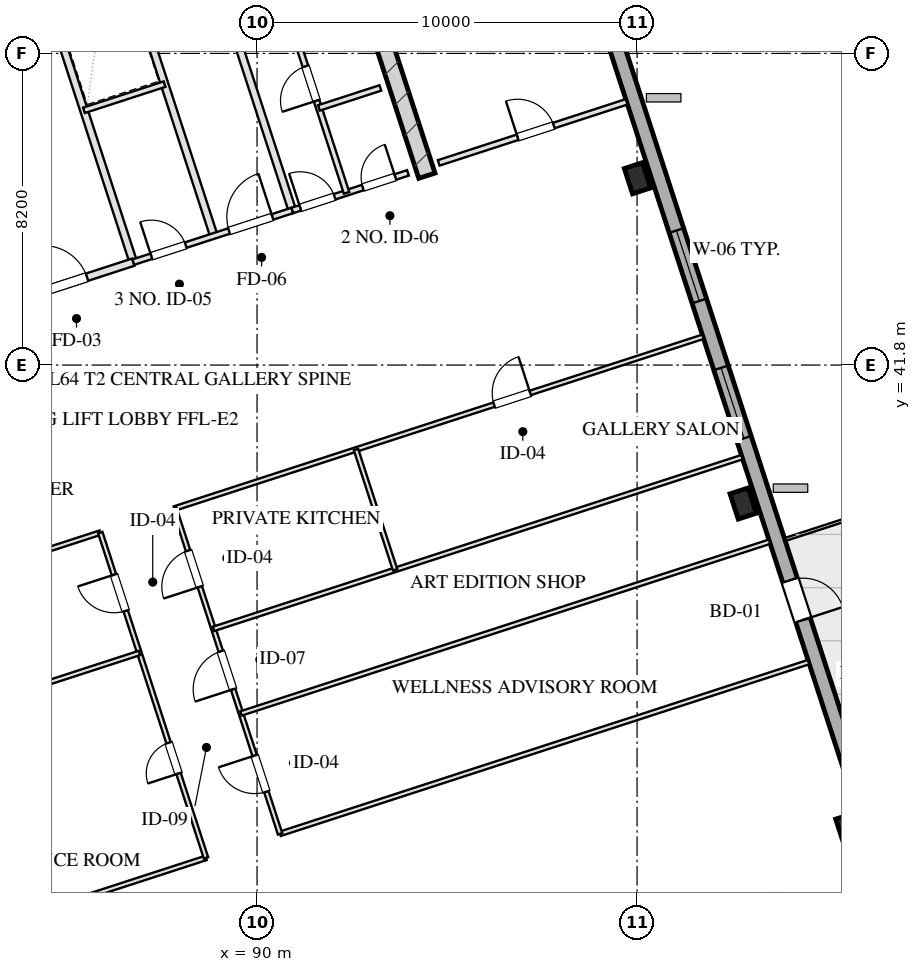
"""IFC4 building model, lengths in metres.
Left out: names, types, materials, properties, quantities, classifications, styles, units other than length and angle.
Written with IfcOpenShell. Run it as: python <this file> out.ifc"""

import sys

from ifc_helpers import new_model, si_unit, direction, frame, frame_2d, origin, origin_2d, place, context, subcontext, project, spatial, rectangle, hollow_rectangle, extrude, element, fill, save


model = new_model("IFC4")
c1 = context("Model", 3, precision=1e-05, world=origin(), true_north=direction((0.0, 1.0)))
c2 = subcontext(c1, "Body", "Model", "MODEL_VIEW")
j1 = project(units=[si_unit("LENGTHUNIT", "METRE"), si_unit("PLANEANGLEUNIT", "RADIAN")], contexts=[c1])
p1 = place(None, origin())
s1 = spatial("IfcSite", under=j1, at=p1, CompositionType="ELEMENT")
p2 = place(p1, origin())
s2 = spatial("IfcBuilding", under=s1, at=p2, CompositionType="ELEMENT")
p3 = place(p2, frame((0.0, 0.0, 237.6)))
s3 = spatial("IfcBuildingStorey", under=s2, at=p3, CompositionType="ELEMENT", Elevation=237.6)
p4 = place(p3, frame((94.469, 46.781, 0.0), z_axis=(0.0, 0.0, 1.0), x_axis=(-0.309004419953, 0.951060601881, 0.0)))
e1 = element("IfcWall", 1, at=p4, inside=s3, PredefinedType="SHEAR", context=c2, shape_type="SweptSolid", body=[
    extrude(rectangle(XDim=9.33, YDim=0.45, at=frame_2d((4.665, 0.0))), origin(), (0.0, 0.0, 1.0), 3.2),
])
for number, where, z_axis, x_axis in (
    (2, (105.573, 29.597, 0.0), (0.0, 0.0, 1.0), (0.951, 0.309, 0.0)),
    (3, (102.792, 38.156, 0.0), (0.0, 0.0, 1.0), (0.951, 0.309, 0.0)),
    (4, (100.01, 46.716, 0.0), (0.0, 0.0, 1.0), (0.951, 0.309, 0.0)),
):
    element("IfcColumn", number, at=place(p3, frame(where, z_axis=z_axis, x_axis=x_axis)), inside=s3, PredefinedType="COLUMN", context=c2, shape_type="SweptSolid", body=[
        extrude(hollow_rectangle(XDim=0.5, YDim=0.7, WallThickness=0.025, at=origin_2d()), origin(), (0.0, 0.0, 1.0), 3.201),
    ])
p5 = place(p3, frame((97.382, 56.586, 0.0), z_axis=(0.0, 0.0, 1.0), x_axis=(0.309016491071, -0.951056679828, 0.0)))
e5 = element("IfcWall", 5, at=p5, inside=s3, PredefinedType="SOLIDWALL", context=c2, shape_type="SweptSolid", body=[
    extrude(rectangle(XDim=38.4, YDim=0.4, at=frame_2d((19.2, 0.0))), origin(), (0.0, 0.0, 1.0), 2.36),
])
p6 = place(p5, frame((15.625, 0.0, 0.75)))
e6 = element("IfcOpeningElement", 6, at=p6, cuts=e5, PredefinedType="OPENING", context=c2, shape_type="SweptSolid", body=[
    extrude(rectangle(XDim=1.95, YDim=1.21, at=frame_2d((0.975, 0.605))), frame((0.0, 0.21, 0.0), z_axis=(0.0, -1.0, 0.0), x_axis=(1.0, 0.0, 0.0)), (0.0, 0.0, 1.0), 0.42),
])
p7 = place(p5, frame((11.825, 0.0, 0.75)))
e7 = element("IfcOpeningElement", 7, at=p7, cuts=e5, PredefinedType="OPENING", context=c2, shape_type="SweptSolid", body=[
    extrude(rectangle(XDim=1.95, YDim=1.21, at=frame_2d((0.975, 0.605))), frame((0.0, 0.21, 0.0), z_axis=(0.0, -1.0, 0.0), x_axis=(1.0, 0.0, 0.0)), (0.0, 0.0, 1.0), 0.42),
])
p8 = place(p5, frame((21.5, 0.0, 0.0)))
e8 = element("IfcOpeningElement", 8, at=p8, cuts=e5, PredefinedType="OPENING", context=c2, shape_type="SweptSolid", body=[
    extrude(rectangle(XDim=1.1, YDim=2.15, at=frame_2d((0.55, 1.075))), frame((0.0, 0.21, 0.0), z_axis=(0.0, -1.0, 0.0), x_axis=(1.0, 0.0, 0.0)), (0.0, 0.0, 1.0), 0.42),
])
p9 = place(p3, frame((86.743, 44.508, 0.0), z_axis=(0.0, 0.0, 1.0), x_axis=(-0.309016001439, 0.951056838919, 0.0)))
e9 = element("IfcWall", 9, at=p9, inside=s3, PredefinedType="PARTITIONING", context=c2, shape_type="SweptSolid", body=[
    extrude(rectangle(XDim=8.43, YDim=0.2, at=frame_2d((4.215, 0.0))), origin(), (0.0, 0.0, 1.0), 2.925),
])
p10 = place(p3, frame((83.101, 43.324, 0.0), z_axis=(0.0, 0.0, 1.0), x_axis=(0.951052804469, 0.309028417967, 0.0)))
e10 = element("IfcWall", 10, at=p10, inside=s3, PredefinedType="PARTITIONING", context=c2, shape_type="SweptSolid", body=[
    extrude(rectangle(XDim=3.83, YDim=0.2, at=frame_2d((1.915, 0.0))), origin(), (0.0, 0.0, 1.0), 2.925),
])
p11 = place(p10, frame((1.35, 0.0, 0.0)))
e11 = element("IfcOpeningElement", 11, at=p11, cuts=e10, PredefinedType="OPENING", context=c2, shape_type="SweptSolid", body=[
    extrude(rectangle(XDim=1.2, YDim=2.05, at=frame_2d((0.6, 1.025))), frame((0.0, 0.11, 0.0), z_axis=(0.0, -1.0, 0.0), x_axis=(1.0, 0.0, 0.0)), (0.0, 0.0, 1.0), 0.22),
])
p12 = place(p3, frame((90.928, 45.868, 0.0), z_axis=(0.0, 0.0, 1.0), x_axis=(-0.309042196757, 0.951048327176, 0.0)))
e12 = element("IfcWall", 12, at=p12, inside=s3, PredefinedType="PARTITIONING", context=c2, shape_type="SweptSolid", body=[
    extrude(rectangle(XDim=8.43, YDim=0.2, at=frame_2d((4.215, 0.0))), origin(), (0.0, 0.0, 1.0), 2.925),
])
p13 = place(p3, frame((88.864, 45.197, 0.0), z_axis=(0.0, 0.0, 1.0), x_axis=(-0.309007490203, 0.951059604335, 0.0)))
e13 = element("IfcWall", 13, at=p13, inside=s3, PredefinedType="PARTITIONING", context=c2, shape_type="SweptSolid", body=[
    extrude(rectangle(XDim=8.43, YDim=0.2, at=frame_2d((4.215, 0.0))), origin(), (0.0, 0.0, 1.0), 2.925),
])
p14 = place(p3, frame((86.743, 44.508, 0.0), z_axis=(0.0, 0.0, 1.0), x_axis=(0.951063829732, 0.308994485023, 0.0)))
e14 = element("IfcWall", 14, at=p14, inside=s3, PredefinedType="PARTITIONING", context=c2, shape_type="SweptSolid", body=[
    extrude(rectangle(XDim=4.4, YDim=0.15, at=frame_2d((2.2, 0.0))), origin(), (0.0, 0.0, 1.0), 2.925),
])
p15 = place(p14, frame((0.5, 0.0, 0.0)))
e15 = element("IfcOpeningElement", 15, at=p15, cuts=e14, PredefinedType="OPENING", context=c2, shape_type="SweptSolid", body=[
    extrude(rectangle(XDim=0.95, YDim=2.05, at=frame_2d((0.475, 1.025))), frame((0.0, 0.085, 0.0), z_axis=(0.0, -1.0, 0.0), x_axis=(1.0, 0.0, 0.0)), (0.0, 0.0, 1.0), 0.17),
])
p16 = place(p14, frame((2.65, 0.0, 0.0)))
e16 = element("IfcOpeningElement", 16, at=p16, cuts=e14, PredefinedType="OPENING", context=c2, shape_type="SweptSolid", body=[
    extrude(rectangle(XDim=1.2, YDim=2.05, at=frame_2d((0.6, 1.025))), frame((0.0, 0.085, 0.0), z_axis=(0.0, -1.0, 0.0), x_axis=(1.0, 0.0, 0.0)), (0.0, 0.0, 1.0), 0.17),
])
p17 = place(p3, frame((85.446, 48.502, 0.0), z_axis=(0.0, 0.0, 1.0), x_axis=(0.951075093106, 0.308959814982, 0.0)))
e17 = element("IfcWall", 17, at=p17, inside=s3, PredefinedType="PARTITIONING", context=c2, shape_type="SweptSolid", body=[
    extrude(rectangle(XDim=2.23, YDim=0.15, at=frame_2d((1.115, 0.0))), origin(), (0.0, 0.0, 1.0), 2.925),
])
p18 = place(p3, frame((90.928, 45.868, 0.0), z_axis=(0.0, 0.0, 1.0), x_axis=(0.951059297078, 0.309008435874, 0.0)))
e18 = element("IfcWall", 18, at=p18, inside=s3, PredefinedType="PARTITIONING", context=c2, shape_type="SweptSolid", body=[
    extrude(rectangle(XDim=3.2, YDim=0.15, at=frame_2d((1.6, 0.0))), origin(), (0.0, 0.0, 1.0), 2.925),
])
p19 = place(p18, frame((0.22, 0.0, 0.0)))
e19 = element("IfcOpeningElement", 19, at=p19, cuts=e18, PredefinedType="OPENING", context=c2, shape_type="SweptSolid", body=[
    extrude(rectangle(XDim=0.95, YDim=2.05, at=frame_2d((0.475, 1.025))), frame((0.0, 0.085, 0.0), z_axis=(0.0, -1.0, 0.0), x_axis=(1.0, 0.0, 0.0)), (0.0, 0.0, 1.0), 0.17),
])
p20 = place(p18, frame((1.95, 0.0, 0.0)))
e20 = element("IfcOpeningElement", 20, at=p20, cuts=e18, PredefinedType="OPENING", context=c2, shape_type="SweptSolid", body=[
    extrude(rectangle(XDim=0.9, YDim=2.05, at=frame_2d((0.45, 1.025))), frame((0.0, 0.085, 0.0), z_axis=(0.0, -1.0, 0.0), x_axis=(1.0, 0.0, 0.0)), (0.0, 0.0, 1.0), 0.17),
])
p21 = place(p3, frame((92.355, 46.331, 0.0), z_axis=(0.0, 0.0, 1.0), x_axis=(-0.309007490203, 0.951059604335, 0.0)))
e21 = element("IfcWall", 21, at=p21, inside=s3, PredefinedType="PARTITIONING", context=c2, shape_type="SweptSolid", body=[
    extrude(rectangle(XDim=8.43, YDim=0.15, at=frame_2d((4.215, 0.0))), origin(), (0.0, 0.0, 1.0), 2.925),
])
p22 = place(p21, frame((2.55, 0.0, 0.0)))
e22 = element("IfcOpeningElement", 22, at=p22, cuts=e21, PredefinedType="OPENING", context=c2, shape_type="SweptSolid", body=[
    extrude(rectangle(XDim=0.95, YDim=2.05, at=frame_2d((0.475, 1.025))), frame((0.0, 0.085, 0.0), z_axis=(0.0, -1.0, 0.0), x_axis=(1.0, 0.0, 0.0)), (0.0, 0.0, 1.0), 0.17),
])
p23 = place(p21, frame((5.6, 0.0, 0.0)))
e23 = element("IfcOpeningElement", 23, at=p23, cuts=e21, PredefinedType="OPENING", context=c2, shape_type="SweptSolid", body=[
    extrude(rectangle(XDim=0.9, YDim=2.05, at=frame_2d((0.45, 1.025))), frame((0.0, 0.085, 0.0), z_axis=(0.0, -1.0, 0.0), x_axis=(1.0, 0.0, 0.0)), (0.0, 0.0, 1.0), 0.17),
])
p24 = place(p3, frame((91.628, 48.566, 0.0), z_axis=(0.0, 0.0, 1.0), x_axis=(0.951054116971, 0.309024378638, 0.0)))
e24 = element("IfcWall", 24, at=p24, inside=s3, PredefinedType="PARTITIONING", context=c2, shape_type="SweptSolid", body=[
    extrude(rectangle(XDim=1.7, YDim=0.15, at=frame_2d((0.85, 0.0))), origin(), (0.0, 0.0, 1.0), 2.925),
])
p25 = place(p3, frame((94.78, 47.119, 0.0), z_axis=(0.0, 0.0, 1.0), x_axis=(0.951055112834, 0.309021313752, 0.0)))
e25 = element("IfcWall", 25, at=p25, inside=s3, PredefinedType="PARTITIONING", context=c2, shape_type="SweptSolid", body=[
    extrude(rectangle(XDim=5.2, YDim=0.15, at=frame_2d((2.6, 0.0))), origin(), (0.0, 0.0, 1.0), 2.925),
])
p26 = place(p25, frame((2.184, 0.0, 0.0)))
e26 = element("IfcOpeningElement", 26, at=p26, cuts=e25, PredefinedType="OPENING", context=c2, shape_type="SweptSolid", body=[
    extrude(rectangle(XDim=1.0, YDim=2.05, at=frame_2d((0.5, 1.025))), frame((0.0, 0.085, 0.0), z_axis=(0.0, -1.0, 0.0), x_axis=(1.0, 0.0, 0.0)), (0.0, 0.0, 1.0), 0.17),
])
p27 = place(p3, frame((78.266, 25.456, 0.0), z_axis=(0.0, 0.0, 1.0), x_axis=(0.951056072529, 0.309018360142, 0.0)))
e27 = element("IfcWall", 27, at=p27, inside=s3, PredefinedType="PARTITIONING", context=c2, shape_type="SweptSolid", body=[
    extrude(rectangle(XDim=10.925, YDim=0.12, at=frame_2d((5.462, 0.0))), origin(), (0.0, 0.0, 1.0), 2.925),
])
p28 = place(p3, frame((90.606, 29.465, 0.0), z_axis=(0.0, 0.0, 1.0), x_axis=(0.951058110432, 0.309012088082, 0.0)))
e28 = element("IfcWall", 28, at=p28, inside=s3, PredefinedType="PARTITIONING", context=c2, shape_type="SweptSolid", body=[
    extrude(rectangle(XDim=14.625, YDim=0.12, at=frame_2d((7.312, 0.0))), origin(), (0.0, 0.0, 1.0), 2.925),
])
p29 = place(p3, frame((75.485, 34.015, 0.0), z_axis=(0.0, 0.0, 1.0), x_axis=(0.951058206457, 0.309011792544, 0.0)))
e29 = element("IfcWall", 29, at=p29, inside=s3, PredefinedType="PARTITIONING", context=c2, shape_type="SweptSolid", body=[
    extrude(rectangle(XDim=10.925, YDim=0.12, at=frame_2d((5.462, 0.0))), origin(), (0.0, 0.0, 1.0), 2.925),
])
p30 = place(p3, frame((87.825, 38.025, 0.0), z_axis=(0.0, 0.0, 1.0), x_axis=(0.951058110432, 0.309012088082, 0.0)))
e30 = element("IfcWall", 30, at=p30, inside=s3, PredefinedType="PARTITIONING", context=c2, shape_type="SweptSolid", body=[
    extrude(rectangle(XDim=14.625, YDim=0.12, at=frame_2d((7.312, 0.0))), origin(), (0.0, 0.0, 1.0), 2.925),
])
p31 = place(p30, frame((8.845, 0.0, 0.0)))
e31 = element("IfcOpeningElement", 31, at=p31, cuts=e30, PredefinedType="OPENING", context=c2, shape_type="SweptSolid", body=[
    extrude(rectangle(XDim=1.0, YDim=2.05, at=frame_2d((0.5, 1.025))), frame((0.0, 0.07, 0.0), z_axis=(0.0, -1.0, 0.0), x_axis=(1.0, 0.0, 0.0)), (0.0, 0.0, 1.0), 0.14),
])
p32 = place(p3, frame((88.656, 28.832, 0.0), z_axis=(0.0, 0.0, 1.0), x_axis=(-0.309000197986, 0.951061973609, 0.0)))
e32 = element("IfcWall", 32, at=p32, inside=s3, PredefinedType="PARTITIONING", context=c2, shape_type="SweptSolid", body=[
    extrude(rectangle(XDim=9.0, YDim=0.12, at=frame_2d((4.5, 0.0))), origin(), (0.0, 0.0, 1.0), 2.925),
])
p33 = place(p32, frame((2.335, 0.0, 0.0)))
e33 = element("IfcOpeningElement", 33, at=p33, cuts=e32, PredefinedType="OPENING", context=c2, shape_type="SweptSolid", body=[
    extrude(rectangle(XDim=0.85, YDim=2.05, at=frame_2d((0.425, 1.025))), frame((0.0, 0.07, 0.0), z_axis=(0.0, -1.0, 0.0), x_axis=(1.0, 0.0, 0.0)), (0.0, 0.0, 1.0), 0.14),
])
p34 = place(p32, frame((6.835, 0.0, 0.0)))
e34 = element("IfcOpeningElement", 34, at=p34, cuts=e32, PredefinedType="OPENING", context=c2, shape_type="SweptSolid", body=[
    extrude(rectangle(XDim=1.0, YDim=2.05, at=frame_2d((0.5, 1.025))), frame((0.0, 0.07, 0.0), z_axis=(0.0, -1.0, 0.0), x_axis=(1.0, 0.0, 0.0)), (0.0, 0.0, 1.0), 0.14),
])
p35 = place(p3, frame((90.606, 29.465, 0.0), z_axis=(0.0, 0.0, 1.0), x_axis=(-0.309024734286, 0.951054001411, 0.0)))
e35 = element("IfcWall", 35, at=p35, inside=s3, PredefinedType="PARTITIONING", context=c2, shape_type="SweptSolid", body=[
    extrude(rectangle(XDim=9.0, YDim=0.12, at=frame_2d((4.5, 0.0))), origin(), (0.0, 0.0, 1.0), 2.925),
])
p36 = place(p35, frame((1.165, 0.0, 0.0)))
e36 = element("IfcOpeningElement", 36, at=p36, cuts=e35, PredefinedType="OPENING", context=c2, shape_type="SweptSolid", body=[
    extrude(rectangle(XDim=1.0, YDim=2.05, at=frame_2d((0.5, 1.025))), frame((0.0, 0.07, 0.0), z_axis=(0.0, -1.0, 0.0), x_axis=(1.0, 0.0, 0.0)), (0.0, 0.0, 1.0), 0.14),
])
p37 = place(p35, frame((4.0, 0.0, 0.0)))
e37 = element("IfcOpeningElement", 37, at=p37, cuts=e35, PredefinedType="OPENING", context=c2, shape_type="SweptSolid", body=[
    extrude(rectangle(XDim=1.05, YDim=2.05, at=frame_2d((0.525, 1.025))), frame((0.0, 0.07, 0.0), z_axis=(0.0, -1.0, 0.0), x_axis=(1.0, 0.0, 0.0)), (0.0, 0.0, 1.0), 0.14),
])
p38 = place(p35, frame((6.835, 0.0, 0.0)))
e38 = element("IfcOpeningElement", 38, at=p38, cuts=e35, PredefinedType="OPENING", context=c2, shape_type="SweptSolid", body=[
    extrude(rectangle(XDim=1.0, YDim=2.05, at=frame_2d((0.5, 1.025))), frame((0.0, 0.07, 0.0), z_axis=(0.0, -1.0, 0.0), x_axis=(1.0, 0.0, 0.0)), (0.0, 0.0, 1.0), 0.14),
])
p39 = place(p3, frame((76.514, 30.848, 0.0), z_axis=(0.0, 0.0, 1.0), x_axis=(0.951056072529, 0.309018360142, 0.0)))
e39 = element("IfcWall", 39, at=p39, inside=s3, PredefinedType="PARTITIONING", context=c2, shape_type="SweptSolid", body=[
    extrude(rectangle(XDim=10.925, YDim=0.12, at=frame_2d((5.462, 0.0))), origin(), (0.0, 0.0, 1.0), 2.925),
])
for number, where, z_axis, x_axis in (
    (40, (89.577, 32.632, 0.0), (0.0, 0.0, 1.0), (0.951, 0.309, 0.0)),
    (41, (88.854, 34.858, 0.0), (0.0, 0.0, 1.0), (0.951, 0.309, 0.0)),
):
    element("IfcWall", number, at=place(p3, frame(where, z_axis=z_axis, x_axis=x_axis)), inside=s3, PredefinedType="PARTITIONING", context=c2, shape_type="SweptSolid", body=[
        extrude(rectangle(XDim=14.625, YDim=0.12, at=frame_2d((7.312, 0.0))), origin(), (0.0, 0.0, 1.0), 2.925),
    ])
p40 = place(p3, frame((93.633, 36.411, 0.0), z_axis=(0.0, 0.0, 1.0), x_axis=(-0.309026391202, 0.95105346303, 0.0)))
e42 = element("IfcWall", 42, at=p40, inside=s3, PredefinedType="PARTITIONING", context=c2, shape_type="SweptSolid", body=[
    extrude(rectangle(XDim=3.33, YDim=0.12, at=frame_2d((1.665, 0.0))), origin(), (0.0, 0.0, 1.0), 2.925),
])
p41 = place(p6, origin())
e43 = element("IfcWindow", 43, at=p41, inside=s3, PartitioningType="TRIPLE_PANEL_VERTICAL", PredefinedType="WINDOW", context=c2, shape_type="SweptSolid", body=[
    extrude(rectangle(XDim=1.95, YDim=1.21, at=frame_2d((0.975, 0.605))), frame((0.0, 0.03, 0.0), z_axis=(0.0, -1.0, 0.0), x_axis=(1.0, 0.0, 0.0)), (0.0, 0.0, 1.0), 0.06),
])
fill(e6, e43)
p42 = place(p7, origin())
e44 = element("IfcWindow", 44, at=p42, inside=s3, PartitioningType="TRIPLE_PANEL_VERTICAL", PredefinedType="WINDOW", context=c2, shape_type="SweptSolid", body=[
    extrude(rectangle(XDim=1.95, YDim=1.21, at=frame_2d((0.975, 0.605))), frame((0.0, 0.03, 0.0), z_axis=(0.0, -1.0, 0.0), x_axis=(1.0, 0.0, 0.0)), (0.0, 0.0, 1.0), 0.06),
])
fill(e7, e44)
p43 = place(p8, origin())
e45 = element("IfcDoor", 45, at=p43, inside=s3, OperationType="SINGLE_SWING_RIGHT", PredefinedType="DOOR", context=c2, shape_type="SweptSolid", body=[
    extrude(rectangle(XDim=1.1, YDim=2.15, at=frame_2d((0.55, 1.075))), frame((0.0, 0.025, 0.0), z_axis=(0.0, -1.0, 0.0), x_axis=(1.0, 0.0, 0.0)), (0.0, 0.0, 1.0), 0.05),
])
fill(e8, e45)
p44 = place(p11, origin())
e46 = element("IfcDoor", 46, at=p44, inside=s3, OperationType="SINGLE_SWING_LEFT", PredefinedType="DOOR", context=c2, shape_type="SweptSolid", body=[
    extrude(rectangle(XDim=1.2, YDim=2.05, at=frame_2d((0.6, 1.025))), frame((0.0, 0.025, 0.0), z_axis=(0.0, -1.0, 0.0), x_axis=(1.0, 0.0, 0.0)), (0.0, 0.0, 1.0), 0.05),
])
fill(e11, e46)
p45 = place(p15, origin())
e47 = element("IfcDoor", 47, at=p45, inside=s3, OperationType="SINGLE_SWING_LEFT", PredefinedType="DOOR", context=c2, shape_type="SweptSolid", body=[
    extrude(rectangle(XDim=0.95, YDim=2.05, at=frame_2d((0.475, 1.025))), frame((0.0, 0.025, 0.0), z_axis=(0.0, -1.0, 0.0), x_axis=(1.0, 0.0, 0.0)), (0.0, 0.0, 1.0), 0.05),
])
fill(e15, e47)
p46 = place(p16, origin())
e48 = element("IfcDoor", 48, at=p46, inside=s3, OperationType="SINGLE_SWING_RIGHT", PredefinedType="DOOR", context=c2, shape_type="SweptSolid", body=[
    extrude(rectangle(XDim=1.2, YDim=2.05, at=frame_2d((0.6, 1.025))), frame((0.0, 0.025, 0.0), z_axis=(0.0, -1.0, 0.0), x_axis=(1.0, 0.0, 0.0)), (0.0, 0.0, 1.0), 0.05),
])
fill(e16, e48)
p47 = place(p19, origin())
e49 = element("IfcDoor", 49, at=p47, inside=s3, OperationType="SINGLE_SWING_LEFT", PredefinedType="DOOR", context=c2, shape_type="SweptSolid", body=[
    extrude(rectangle(XDim=0.95, YDim=2.05, at=frame_2d((0.475, 1.025))), frame((0.0, 0.025, 0.0), z_axis=(0.0, -1.0, 0.0), x_axis=(1.0, 0.0, 0.0)), (0.0, 0.0, 1.0), 0.05),
])
fill(e19, e49)
p48 = place(p20, origin())
e50 = element("IfcDoor", 50, at=p48, inside=s3, OperationType="SINGLE_SWING_RIGHT", PredefinedType="DOOR", context=c2, shape_type="SweptSolid", body=[
    extrude(rectangle(XDim=0.9, YDim=2.05, at=frame_2d((0.45, 1.025))), frame((0.0, 0.025, 0.0), z_axis=(0.0, -1.0, 0.0), x_axis=(1.0, 0.0, 0.0)), (0.0, 0.0, 1.0), 0.05),
])
fill(e20, e50)
p49 = place(p22, origin())
e51 = element("IfcDoor", 51, at=p49, inside=s3, OperationType="SINGLE_SWING_LEFT", PredefinedType="DOOR", context=c2, shape_type="SweptSolid", body=[
    extrude(rectangle(XDim=0.95, YDim=2.05, at=frame_2d((0.475, 1.025))), frame((0.0, 0.025, 0.0), z_axis=(0.0, -1.0, 0.0), x_axis=(1.0, 0.0, 0.0)), (0.0, 0.0, 1.0), 0.05),
])
fill(e22, e51)
p50 = place(p26, origin())
e52 = element("IfcDoor", 52, at=p50, inside=s3, OperationType="SINGLE_SWING_LEFT", PredefinedType="DOOR", context=c2, shape_type="SweptSolid", body=[
    extrude(rectangle(XDim=1.0, YDim=2.05, at=frame_2d((0.5, 1.025))), frame((0.0, 0.025, 0.0), z_axis=(0.0, -1.0, 0.0), x_axis=(1.0, 0.0, 0.0)), (0.0, 0.0, 1.0), 0.05),
])
fill(e26, e52)
p51 = place(p31, origin())
e53 = element("IfcDoor", 53, at=p51, inside=s3, OperationType="SINGLE_SWING_RIGHT", PredefinedType="DOOR", context=c2, shape_type="SweptSolid", body=[
    extrude(rectangle(XDim=1.0, YDim=2.05, at=frame_2d((0.5, 1.025))), frame((0.0, 0.025, 0.0), z_axis=(0.0, -1.0, 0.0), x_axis=(1.0, 0.0, 0.0)), (0.0, 0.0, 1.0), 0.05),
])
fill(e31, e53)
p52 = place(p33, origin())
e54 = element("IfcDoor", 54, at=p52, inside=s3, OperationType="SINGLE_SWING_LEFT", PredefinedType="DOOR", context=c2, shape_type="SweptSolid", body=[
    extrude(rectangle(XDim=0.85, YDim=2.05, at=frame_2d((0.425, 1.025))), frame((0.0, 0.025, 0.0), z_axis=(0.0, -1.0, 0.0), x_axis=(1.0, 0.0, 0.0)), (0.0, 0.0, 1.0), 0.05),
])
fill(e33, e54)
p53 = place(p34, origin())
e55 = element("IfcDoor", 55, at=p53, inside=s3, OperationType="SINGLE_SWING_RIGHT", PredefinedType="DOOR", context=c2, shape_type="SweptSolid", body=[
    extrude(rectangle(XDim=1.0, YDim=2.05, at=frame_2d((0.5, 1.025))), frame((0.0, 0.025, 0.0), z_axis=(0.0, -1.0, 0.0), x_axis=(1.0, 0.0, 0.0)), (0.0, 0.0, 1.0), 0.05),
])
fill(e34, e55)
p54 = place(p36, origin())
e56 = element("IfcDoor", 56, at=p54, inside=s3, OperationType="SINGLE_SWING_RIGHT", PredefinedType="DOOR", context=c2, shape_type="SweptSolid", body=[
    extrude(rectangle(XDim=1.0, YDim=2.05, at=frame_2d((0.5, 1.025))), frame((0.0, 0.025, 0.0), z_axis=(0.0, -1.0, 0.0), x_axis=(1.0, 0.0, 0.0)), (0.0, 0.0, 1.0), 0.05),
])
fill(e36, e56)
p55 = place(p37, origin())
e57 = element("IfcDoor", 57, at=p55, inside=s3, OperationType="SINGLE_SWING_LEFT", PredefinedType="DOOR", context=c2, shape_type="SweptSolid", body=[
    extrude(rectangle(XDim=1.05, YDim=2.05, at=frame_2d((0.525, 1.025))), frame((0.0, 0.025, 0.0), z_axis=(0.0, -1.0, 0.0), x_axis=(1.0, 0.0, 0.0)), (0.0, 0.0, 1.0), 0.05),
])
fill(e37, e57)
p56 = place(p38, origin())
e58 = element("IfcDoor", 58, at=p56, inside=s3, OperationType="SINGLE_SWING_LEFT", PredefinedType="DOOR", context=c2, shape_type="SweptSolid", body=[
    extrude(rectangle(XDim=1.0, YDim=2.05, at=frame_2d((0.5, 1.025))), frame((0.0, 0.025, 0.0), z_axis=(0.0, -1.0, 0.0), x_axis=(1.0, 0.0, 0.0)), (0.0, 0.0, 1.0), 0.05),
])
fill(e38, e58)
save(model, sys.argv[1])
